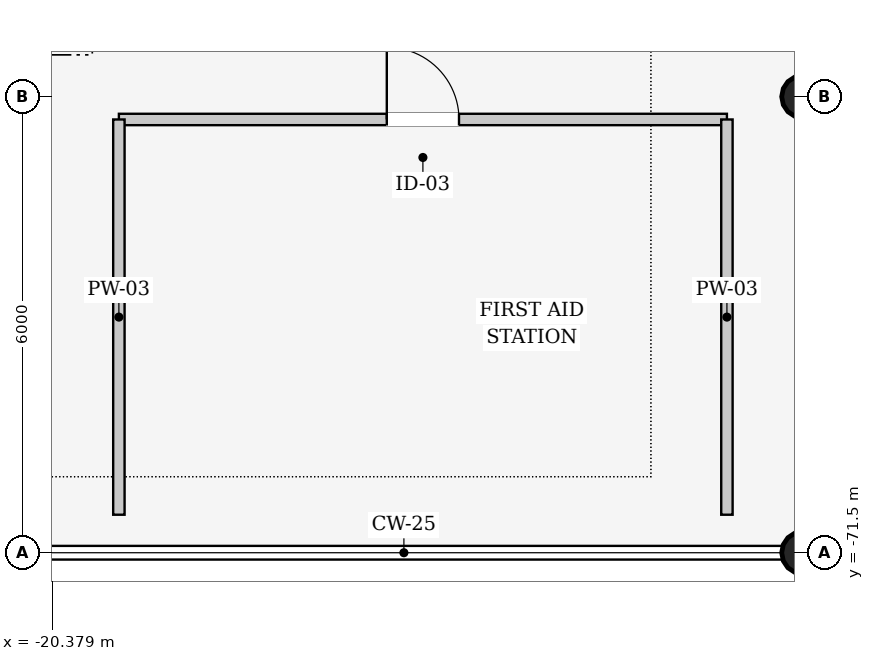
"""IFC4 building model, lengths in metres.
Left out: names, types, materials, properties, quantities, classifications, styles, units other than length and angle.
Written with IfcOpenShell. Run it as: python <this file> out.ifc"""

import sys

from ifc_helpers import new_model, si_unit, direction, frame, frame_2d, origin, origin_2d, place, context, subcontext, project, spatial, rectangle, hollow_circle, extrude, element, fill, save


model = new_model("IFC4")
c1 = context("Model", 3, precision=1e-05, world=origin(), true_north=direction((0.0, 1.0)))
c2 = subcontext(c1, "Body", "Model", "MODEL_VIEW")
j1 = project(units=[si_unit("LENGTHUNIT", "METRE"), si_unit("PLANEANGLEUNIT", "RADIAN")], contexts=[c1])
p1 = place(None, origin())
s1 = spatial("IfcSite", under=j1, at=p1, CompositionType="ELEMENT")
p2 = place(p1, origin())
s2 = spatial("IfcBuilding", under=s1, at=p2, CompositionType="ELEMENT")
p3 = place(p2, frame((0.0, 0.0, 6.0)))
s3 = spatial("IfcBuildingStorey", under=s2, at=p3, CompositionType="ELEMENT", Elevation=6.0)
for number, where, z_axis, x_axis in (
    (1, (-10.5, -71.5, 0.0), (0.0, 0.0, 1.0), (1.0, 0.0, 0.0)),
    (2, (-10.5, -65.5, 0.0), (0.0, 0.0, 1.0), (1.0, 0.0, 0.0)),
):
    element("IfcColumn", number, at=place(p3, frame(where, z_axis=z_axis, x_axis=x_axis)), inside=s3, PredefinedType="COLUMN", context=c2, shape_type="SweptSolid", body=[
        extrude(hollow_circle(Radius=0.28, WallThickness=0.02, at=origin_2d()), origin(), (0.0, 0.0, 1.0), 5.4),
    ])
p4 = place(p3, frame((-19.5, -65.8, 0.0), z_axis=(0.0, 0.0, 1.0), x_axis=(1.0, 0.0, 0.0)))
e3 = element("IfcWall", 3, at=p4, inside=s3, PredefinedType="PARTITIONING", context=c2, shape_type="SweptSolid", body=[
    extrude(rectangle(XDim=8.0, YDim=0.15, at=frame_2d((4.0, 0.0))), origin(), (0.0, 0.0, 1.0), 4.245),
])
p5 = place(p4, frame((3.525, 0.0, 0.0)))
e4 = element("IfcOpeningElement", 4, at=p5, cuts=e3, PredefinedType="OPENING", context=c2, shape_type="SweptSolid", body=[
    extrude(rectangle(XDim=0.95, YDim=2.15, at=frame_2d((0.475, 1.075))), frame((0.0, 0.085, 0.0), z_axis=(0.0, -1.0, 0.0), x_axis=(1.0, 0.0, 0.0)), (0.0, 0.0, 1.0), 0.17),
])
for number, where, z_axis, x_axis in (
    (5, (-11.5, -65.8, 0.0), (0.0, 0.0, 1.0), (0.0, -1.0, 0.0)),
    (6, (-19.5, -71.0, 0.0), (0.0, 0.0, 1.0), (0.0, 1.0, 0.0)),
):
    element("IfcWall", number, at=place(p3, frame(where, z_axis=z_axis, x_axis=x_axis)), inside=s3, PredefinedType="PARTITIONING", context=c2, shape_type="SweptSolid", body=[
        extrude(rectangle(XDim=5.2, YDim=0.15, at=frame_2d((2.6, 0.0))), origin(), (0.0, 0.0, 1.0), 4.245),
    ])
p6 = place(p5, origin())
e7 = element("IfcDoor", 7, at=p6, inside=s3, OperationType="SINGLE_SWING_LEFT", PredefinedType="DOOR", context=c2, shape_type="SweptSolid", body=[
    extrude(rectangle(XDim=0.95, YDim=2.15, at=frame_2d((0.475, 1.075))), frame((0.0, 0.025, 0.0), z_axis=(0.0, -1.0, 0.0), x_axis=(1.0, 0.0, 0.0)), (0.0, 0.0, 1.0), 0.05),
])
fill(e4, e7)
save(model, sys.argv[1])
